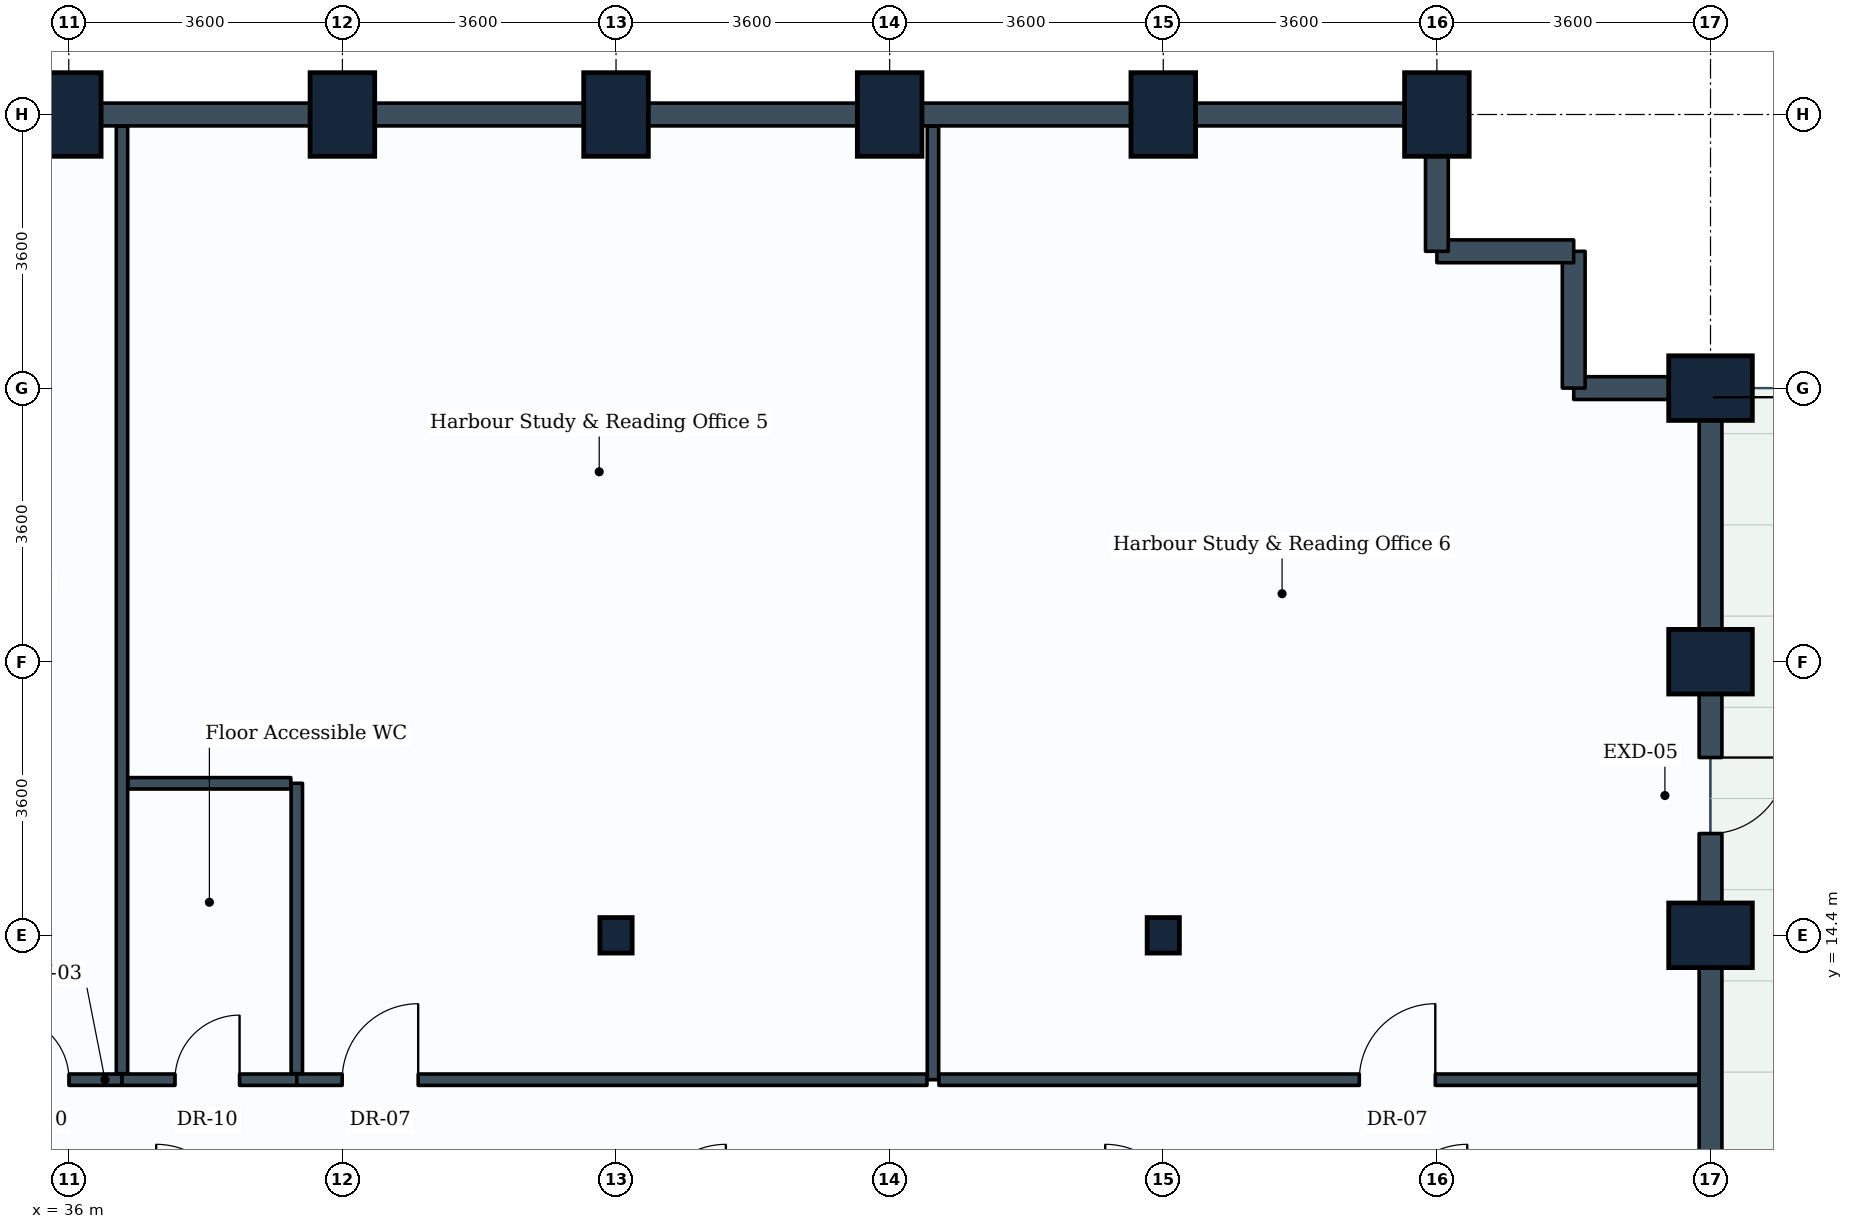
"""IFC4 building model, lengths in metres.
Left out: names, types, materials, properties, quantities, classifications, styles, units other than length and angle.
Written with IfcOpenShell. Run it as: python <this file> out.ifc"""

import sys

from ifc_helpers import new_model, si_unit, direction, frame, frame_2d, origin, origin_2d, place, context, subcontext, project, spatial, rectangle, i_section, extrude, element, fill, save


model = new_model("IFC4")
c1 = context("Model", 3, precision=1e-05, world=origin(), true_north=direction((0.0, 1.0)))
c2 = subcontext(c1, "Body", "Model", "MODEL_VIEW")
j1 = project(units=[si_unit("LENGTHUNIT", "METRE"), si_unit("PLANEANGLEUNIT", "RADIAN")], contexts=[c1])
p1 = place(None, origin())
s1 = spatial("IfcSite", under=j1, at=p1, CompositionType="ELEMENT")
p2 = place(p1, origin())
s2 = spatial("IfcBuilding", under=s1, at=p2, CompositionType="ELEMENT")
p3 = place(p2, frame((0.0, 0.0, 84.0)))
s3 = spatial("IfcBuildingStorey", under=s2, at=p3, CompositionType="ELEMENT", Elevation=84.0)
for number, where, z_axis, x_axis in (
    (1, (36.0, 25.2, 0.0), (0.0, 0.0, 1.0), (1.0, 0.0, 0.0)),
    (2, (39.6, 25.2, 0.0), (0.0, 0.0, 1.0), (1.0, 0.0, 0.0)),
):
    element("IfcColumn", number, at=place(p3, frame(where, z_axis=z_axis, x_axis=x_axis)), inside=s3, PredefinedType="COLUMN", context=c2, shape_type="SweptSolid", body=[
        extrude(rectangle(XDim=0.85, YDim=1.1, at=origin_2d()), origin(), (0.0, 0.0, 1.0), 3.9),
    ])
p4 = place(p3, frame((43.2, 14.4, 0.0), z_axis=(0.0, 0.0, 1.0), x_axis=(1.0, 0.0, 0.0)))
e3 = element("IfcColumn", 3, at=p4, inside=s3, PredefinedType="COLUMN", context=c2, shape_type="SweptSolid", body=[
    extrude(i_section(OverallWidth=0.424, OverallDepth=0.467, WebThickness=0.033, FlangeThickness=0.053, FilletRadius=0.015, at=origin_2d()), origin(), (0.0, 0.0, 1.0), 3.9),
])
for number, where, z_axis, x_axis in (
    (4, (43.2, 25.2, 0.0), (0.0, 0.0, 1.0), (1.0, 0.0, 0.0)),
    (5, (46.8, 25.2, 0.0), (0.0, 0.0, 1.0), (1.0, 0.0, 0.0)),
):
    element("IfcColumn", number, at=place(p3, frame(where, z_axis=z_axis, x_axis=x_axis)), inside=s3, PredefinedType="COLUMN", context=c2, shape_type="SweptSolid", body=[
        extrude(rectangle(XDim=0.85, YDim=1.1, at=origin_2d()), origin(), (0.0, 0.0, 1.0), 3.9),
    ])
p5 = place(p3, frame((50.4, 14.4, 0.0), z_axis=(0.0, 0.0, 1.0), x_axis=(1.0, 0.0, 0.0)))
e6 = element("IfcColumn", 6, at=p5, inside=s3, PredefinedType="COLUMN", context=c2, shape_type="SweptSolid", body=[
    extrude(i_section(OverallWidth=0.424, OverallDepth=0.467, WebThickness=0.033, FlangeThickness=0.053, FilletRadius=0.015, at=origin_2d()), origin(), (0.0, 0.0, 1.0), 3.9),
])
for number, where, z_axis, x_axis in (
    (7, (50.4, 25.2, 0.0), (0.0, 0.0, 1.0), (1.0, 0.0, 0.0)),
    (8, (54.0, 25.2, 0.0), (0.0, 0.0, 1.0), (1.0, 0.0, 0.0)),
    (9, (57.6, 14.4, 0.0), (0.0, 0.0, 1.0), (0.0, 1.0, 0.0)),
    (10, (57.6, 18.0, 0.0), (0.0, 0.0, 1.0), (0.0, 1.0, 0.0)),
    (11, (57.6, 21.6, 0.0), (0.0, 0.0, 1.0), (0.0, 1.0, 0.0)),
):
    element("IfcColumn", number, at=place(p3, frame(where, z_axis=z_axis, x_axis=x_axis)), inside=s3, PredefinedType="COLUMN", context=c2, shape_type="SweptSolid", body=[
        extrude(rectangle(XDim=0.85, YDim=1.1, at=origin_2d()), origin(), (0.0, 0.0, 1.0), 3.9),
    ])
p6 = place(p3, frame((57.6, 14.4, 0.0), z_axis=(0.0, 0.0, 1.0), x_axis=(0.0, -1.0, 0.0)))
e12 = element("IfcWall", 12, at=p6, inside=s3, PredefinedType="STANDARD", context=c2, shape_type="SweptSolid", body=[
    extrude(rectangle(XDim=3.6, YDim=0.3, at=frame_2d((1.8, 0.0))), origin(), (0.0, 0.0, 1.0), 2.93),
])
p7 = place(p3, frame((57.6, 18.0, 0.0), z_axis=(0.0, 0.0, 1.0), x_axis=(0.0, -1.0, 0.0)))
e13 = element("IfcWall", 13, at=p7, inside=s3, PredefinedType="STANDARD", context=c2, shape_type="SweptSolid", body=[
    extrude(rectangle(XDim=3.6, YDim=0.3, at=frame_2d((1.8, 0.0))), origin(), (0.0, 0.0, 1.0), 2.93),
])
p8 = place(p7, frame((1.261, 0.0, 0.0)))
e14 = element("IfcOpeningElement", 14, at=p8, cuts=e13, PredefinedType="OPENING", context=c2, shape_type="SweptSolid", body=[
    extrude(rectangle(XDim=1.0, YDim=2.1, at=frame_2d((0.5, 1.05))), frame((0.0, 0.16, 0.0), z_axis=(0.0, -1.0, 0.0), x_axis=(1.0, 0.0, 0.0)), (0.0, 0.0, 1.0), 0.32),
])
p9 = place(p3, frame((57.6, 21.6, 0.0), z_axis=(0.0, 0.0, 1.0), x_axis=(0.0, -1.0, 0.0)))
e15 = element("IfcWall", 15, at=p9, inside=s3, PredefinedType="STANDARD", context=c2, shape_type="SweptSolid", body=[
    extrude(rectangle(XDim=3.6, YDim=0.3, at=frame_2d((1.8, 0.0))), origin(), (0.0, 0.0, 1.0), 2.93),
])
p10 = place(p3, frame((55.8, 21.6, 0.0), z_axis=(0.0, 0.0, 1.0), x_axis=(1.0, 0.0, 0.0)))
e16 = element("IfcWall", 16, at=p10, inside=s3, PredefinedType="STANDARD", context=c2, shape_type="SweptSolid", body=[
    extrude(rectangle(XDim=1.8, YDim=0.3, at=frame_2d((0.9, 0.0))), origin(), (0.0, 0.0, 1.0), 2.93),
])
p11 = place(p3, frame((55.8, 23.4, 0.0), z_axis=(0.0, 0.0, 1.0), x_axis=(0.0, -1.0, 0.0)))
e17 = element("IfcWall", 17, at=p11, inside=s3, PredefinedType="STANDARD", context=c2, shape_type="SweptSolid", body=[
    extrude(rectangle(XDim=1.8, YDim=0.3, at=frame_2d((0.9, 0.0))), origin(), (0.0, 0.0, 1.0), 3.635),
])
p12 = place(p3, frame((54.0, 23.4, 0.0), z_axis=(0.0, 0.0, 1.0), x_axis=(1.0, 0.0, 0.0)))
e18 = element("IfcWall", 18, at=p12, inside=s3, PredefinedType="STANDARD", context=c2, shape_type="SweptSolid", body=[
    extrude(rectangle(XDim=1.8, YDim=0.3, at=frame_2d((0.9, 0.0))), origin(), (0.0, 0.0, 1.0), 3.635),
])
p13 = place(p3, frame((54.0, 25.2, 0.0), z_axis=(0.0, 0.0, 1.0), x_axis=(0.0, -1.0, 0.0)))
e19 = element("IfcWall", 19, at=p13, inside=s3, PredefinedType="STANDARD", context=c2, shape_type="SweptSolid", body=[
    extrude(rectangle(XDim=1.8, YDim=0.3, at=frame_2d((0.9, 0.0))), origin(), (0.0, 0.0, 1.0), 2.93),
])
p14 = place(p3, frame((50.4, 25.2, 0.0), z_axis=(0.0, 0.0, 1.0), x_axis=(1.0, 0.0, 0.0)))
e20 = element("IfcWall", 20, at=p14, inside=s3, PredefinedType="STANDARD", context=c2, shape_type="SweptSolid", body=[
    extrude(rectangle(XDim=3.6, YDim=0.3, at=frame_2d((1.8, 0.0))), origin(), (0.0, 0.0, 1.0), 2.93),
])
p15 = place(p3, frame((46.8, 25.2, 0.0), z_axis=(0.0, 0.0, 1.0), x_axis=(1.0, 0.0, 0.0)))
e21 = element("IfcWall", 21, at=p15, inside=s3, PredefinedType="STANDARD", context=c2, shape_type="SweptSolid", body=[
    extrude(rectangle(XDim=3.6, YDim=0.3, at=frame_2d((1.8, 0.0))), origin(), (0.0, 0.0, 1.0), 2.93),
])
p16 = place(p3, frame((43.2, 25.2, 0.0), z_axis=(0.0, 0.0, 1.0), x_axis=(1.0, 0.0, 0.0)))
e22 = element("IfcWall", 22, at=p16, inside=s3, PredefinedType="STANDARD", context=c2, shape_type="SweptSolid", body=[
    extrude(rectangle(XDim=3.6, YDim=0.3, at=frame_2d((1.8, 0.0))), origin(), (0.0, 0.0, 1.0), 2.93),
])
p17 = place(p3, frame((39.6, 25.2, 0.0), z_axis=(0.0, 0.0, 1.0), x_axis=(1.0, 0.0, 0.0)))
e23 = element("IfcWall", 23, at=p17, inside=s3, PredefinedType="STANDARD", context=c2, shape_type="SweptSolid", body=[
    extrude(rectangle(XDim=3.6, YDim=0.3, at=frame_2d((1.8, 0.0))), origin(), (0.0, 0.0, 1.0), 2.93),
])
for number, where, z_axis, x_axis in (
    (24, (36.0, 25.2, 0.0), (0.0, 0.0, 1.0), (1.0, 0.0, 0.0)),
    (25, (32.4, 25.2, 0.0), (0.0, 0.0, 1.0), (1.0, 0.0, 0.0)),
):
    element("IfcWall", number, at=place(p3, frame(where, z_axis=z_axis, x_axis=x_axis)), inside=s3, PredefinedType="STANDARD", context=c2, shape_type="SweptSolid", body=[
        extrude(rectangle(XDim=3.6, YDim=0.3, at=frame_2d((1.8, 0.0))), origin(), (0.0, 0.0, 1.0), 2.93),
    ])
p18 = place(p3, frame((34.479, 12.5, 0.0), z_axis=(0.0, 0.0, 1.0), x_axis=(1.0, 0.0, 0.0)))
e26 = element("IfcWall", 26, at=p18, inside=s3, PredefinedType="PARTITIONING", context=c2, shape_type="SweptSolid", body=[
    extrude(rectangle(XDim=2.221, YDim=0.15, at=frame_2d((1.11, 0.0))), origin(), (0.0, 0.0, 1.0), 3.18),
])
p19 = place(p18, frame((0.674, 0.0, 0.0)))
e27 = element("IfcOpeningElement", 27, at=p19, cuts=e26, PredefinedType="OPENING", context=c2, shape_type="SweptSolid", body=[
    extrude(rectangle(XDim=0.85, YDim=2.1, at=frame_2d((0.425, 1.05))), frame((0.0, 0.085, 0.0), z_axis=(0.0, -1.0, 0.0), x_axis=(1.0, 0.0, 0.0)), (0.0, 0.0, 1.0), 0.17),
])
p20 = place(p3, frame((36.7, 12.579, 0.0), z_axis=(0.0, 0.0, 1.0), x_axis=(0.0, 1.0, 0.0)))
e28 = element("IfcWall", 28, at=p20, inside=s3, PredefinedType="PARTITIONING", context=c2, shape_type="SweptSolid", body=[
    extrude(rectangle(XDim=12.467, YDim=0.15, at=frame_2d((6.233, 0.0))), origin(), (0.0, 0.0, 1.0), 2.93),
])
p21 = place(p3, frame((36.7, 12.5, 0.0), z_axis=(0.0, 0.0, 1.0), x_axis=(1.0, 0.0, 0.0)))
e29 = element("IfcWall", 29, at=p21, inside=s3, PredefinedType="PARTITIONING", context=c2, shape_type="SweptSolid", body=[
    extrude(rectangle(XDim=2.3, YDim=0.15, at=frame_2d((1.15, 0.0))), origin(), (0.0, 0.0, 1.0), 3.635),
])
p22 = place(p21, frame((0.697, 0.0, 0.0)))
e30 = element("IfcOpeningElement", 30, at=p22, cuts=e29, PredefinedType="OPENING", context=c2, shape_type="SweptSolid", body=[
    extrude(rectangle(XDim=0.85, YDim=2.1, at=frame_2d((0.425, 1.05))), frame((0.0, 0.085, 0.0), z_axis=(0.0, -1.0, 0.0), x_axis=(1.0, 0.0, 0.0)), (0.0, 0.0, 1.0), 0.17),
])
p23 = place(p3, frame((39.0, 12.579, 0.0), z_axis=(0.0, 0.0, 1.0), x_axis=(0.0, 1.0, 0.0)))
e31 = element("IfcWall", 31, at=p23, inside=s3, PredefinedType="PARTITIONING", context=c2, shape_type="SweptSolid", body=[
    extrude(rectangle(XDim=3.821, YDim=0.15, at=frame_2d((1.91, 0.0))), origin(), (0.0, 0.0, 1.0), 3.18),
])
p24 = place(p3, frame((36.779, 16.4, 0.0), z_axis=(0.0, 0.0, 1.0), x_axis=(1.0, 0.0, 0.0)))
e32 = element("IfcWall", 32, at=p24, inside=s3, PredefinedType="PARTITIONING", context=c2, shape_type="SweptSolid", body=[
    extrude(rectangle(XDim=2.142, YDim=0.15, at=frame_2d((1.071, 0.0))), origin(), (0.0, 0.0, 1.0), 3.635),
])
p25 = place(p3, frame((47.37, 12.5, 0.0), z_axis=(0.0, 0.0, 1.0), x_axis=(0.0, 1.0, 0.0)))
e33 = element("IfcWall", 33, at=p25, inside=s3, PredefinedType="PARTITIONING", context=c2, shape_type="SweptSolid", body=[
    extrude(rectangle(XDim=12.546, YDim=0.15, at=frame_2d((6.273, 0.0))), origin(), (0.0, 0.0, 1.0), 2.93),
])
p26 = place(p3, frame((39.0, 12.5, 0.0), z_axis=(0.0, 0.0, 1.0), x_axis=(1.0, 0.0, 0.0)))
e34 = element("IfcWall", 34, at=p26, inside=s3, PredefinedType="PARTITIONING", context=c2, shape_type="SweptSolid", body=[
    extrude(rectangle(XDim=8.291, YDim=0.15, at=frame_2d((4.146, 0.0))), origin(), (0.0, 0.0, 1.0), 3.19),
])
p27 = place(p26, frame((0.597, 0.0, 0.0)))
e35 = element("IfcOpeningElement", 35, at=p27, cuts=e34, PredefinedType="OPENING", context=c2, shape_type="SweptSolid", body=[
    extrude(rectangle(XDim=1.0, YDim=2.1, at=frame_2d((0.5, 1.05))), frame((0.0, 0.085, 0.0), z_axis=(0.0, -1.0, 0.0), x_axis=(1.0, 0.0, 0.0)), (0.0, 0.0, 1.0), 0.17),
])
p28 = place(p3, frame((47.449, 12.5, 0.0), z_axis=(0.0, 0.0, 1.0), x_axis=(1.0, 0.0, 0.0)))
e36 = element("IfcWall", 36, at=p28, inside=s3, PredefinedType="PARTITIONING", context=c2, shape_type="SweptSolid", body=[
    extrude(rectangle(XDim=9.997, YDim=0.15, at=frame_2d((4.999, 0.0))), origin(), (0.0, 0.0, 1.0), 2.93),
])
p29 = place(p28, frame((5.53, 0.0, 0.0)))
e37 = element("IfcOpeningElement", 37, at=p29, cuts=e36, PredefinedType="OPENING", context=c2, shape_type="SweptSolid", body=[
    extrude(rectangle(XDim=1.0, YDim=2.1, at=frame_2d((0.5, 1.05))), frame((0.0, 0.085, 0.0), z_axis=(0.0, -1.0, 0.0), x_axis=(1.0, 0.0, 0.0)), (0.0, 0.0, 1.0), 0.17),
])
p30 = place(p8, origin())
e38 = element("IfcDoor", 38, at=p30, inside=s3, OperationType="SINGLE_SWING_LEFT", PredefinedType="DOOR", context=c2, shape_type="SweptSolid", body=[
    extrude(rectangle(XDim=1.0, YDim=2.1, at=frame_2d((0.5, 1.05))), frame((0.0, 0.025, 0.0), z_axis=(0.0, -1.0, 0.0), x_axis=(1.0, 0.0, 0.0)), (0.0, 0.0, 1.0), 0.05),
])
fill(e14, e38)
p31 = place(p19, origin())
e39 = element("IfcDoor", 39, at=p31, inside=s3, OperationType="SINGLE_SWING_LEFT", PredefinedType="DOOR", context=c2, shape_type="SweptSolid", body=[
    extrude(rectangle(XDim=0.85, YDim=2.1, at=frame_2d((0.425, 1.05))), frame((0.0, 0.025, 0.0), z_axis=(0.0, -1.0, 0.0), x_axis=(1.0, 0.0, 0.0)), (0.0, 0.0, 1.0), 0.05),
])
fill(e27, e39)
p32 = place(p22, origin())
e40 = element("IfcDoor", 40, at=p32, inside=s3, OperationType="SINGLE_SWING_RIGHT", PredefinedType="DOOR", context=c2, shape_type="SweptSolid", body=[
    extrude(rectangle(XDim=0.85, YDim=2.1, at=frame_2d((0.425, 1.05))), frame((0.0, 0.025, 0.0), z_axis=(0.0, -1.0, 0.0), x_axis=(1.0, 0.0, 0.0)), (0.0, 0.0, 1.0), 0.05),
])
fill(e30, e40)
p33 = place(p27, origin())
e41 = element("IfcDoor", 41, at=p33, inside=s3, OperationType="SINGLE_SWING_RIGHT", PredefinedType="DOOR", context=c2, shape_type="SweptSolid", body=[
    extrude(rectangle(XDim=1.0, YDim=2.1, at=frame_2d((0.5, 1.05))), frame((0.0, 0.025, 0.0), z_axis=(0.0, -1.0, 0.0), x_axis=(1.0, 0.0, 0.0)), (0.0, 0.0, 1.0), 0.05),
])
fill(e35, e41)
p34 = place(p29, origin())
e42 = element("IfcDoor", 42, at=p34, inside=s3, OperationType="SINGLE_SWING_RIGHT", PredefinedType="DOOR", context=c2, shape_type="SweptSolid", body=[
    extrude(rectangle(XDim=1.0, YDim=2.1, at=frame_2d((0.5, 1.05))), frame((0.0, 0.025, 0.0), z_axis=(0.0, -1.0, 0.0), x_axis=(1.0, 0.0, 0.0)), (0.0, 0.0, 1.0), 0.05),
])
fill(e37, e42)
save(model, sys.argv[1])
